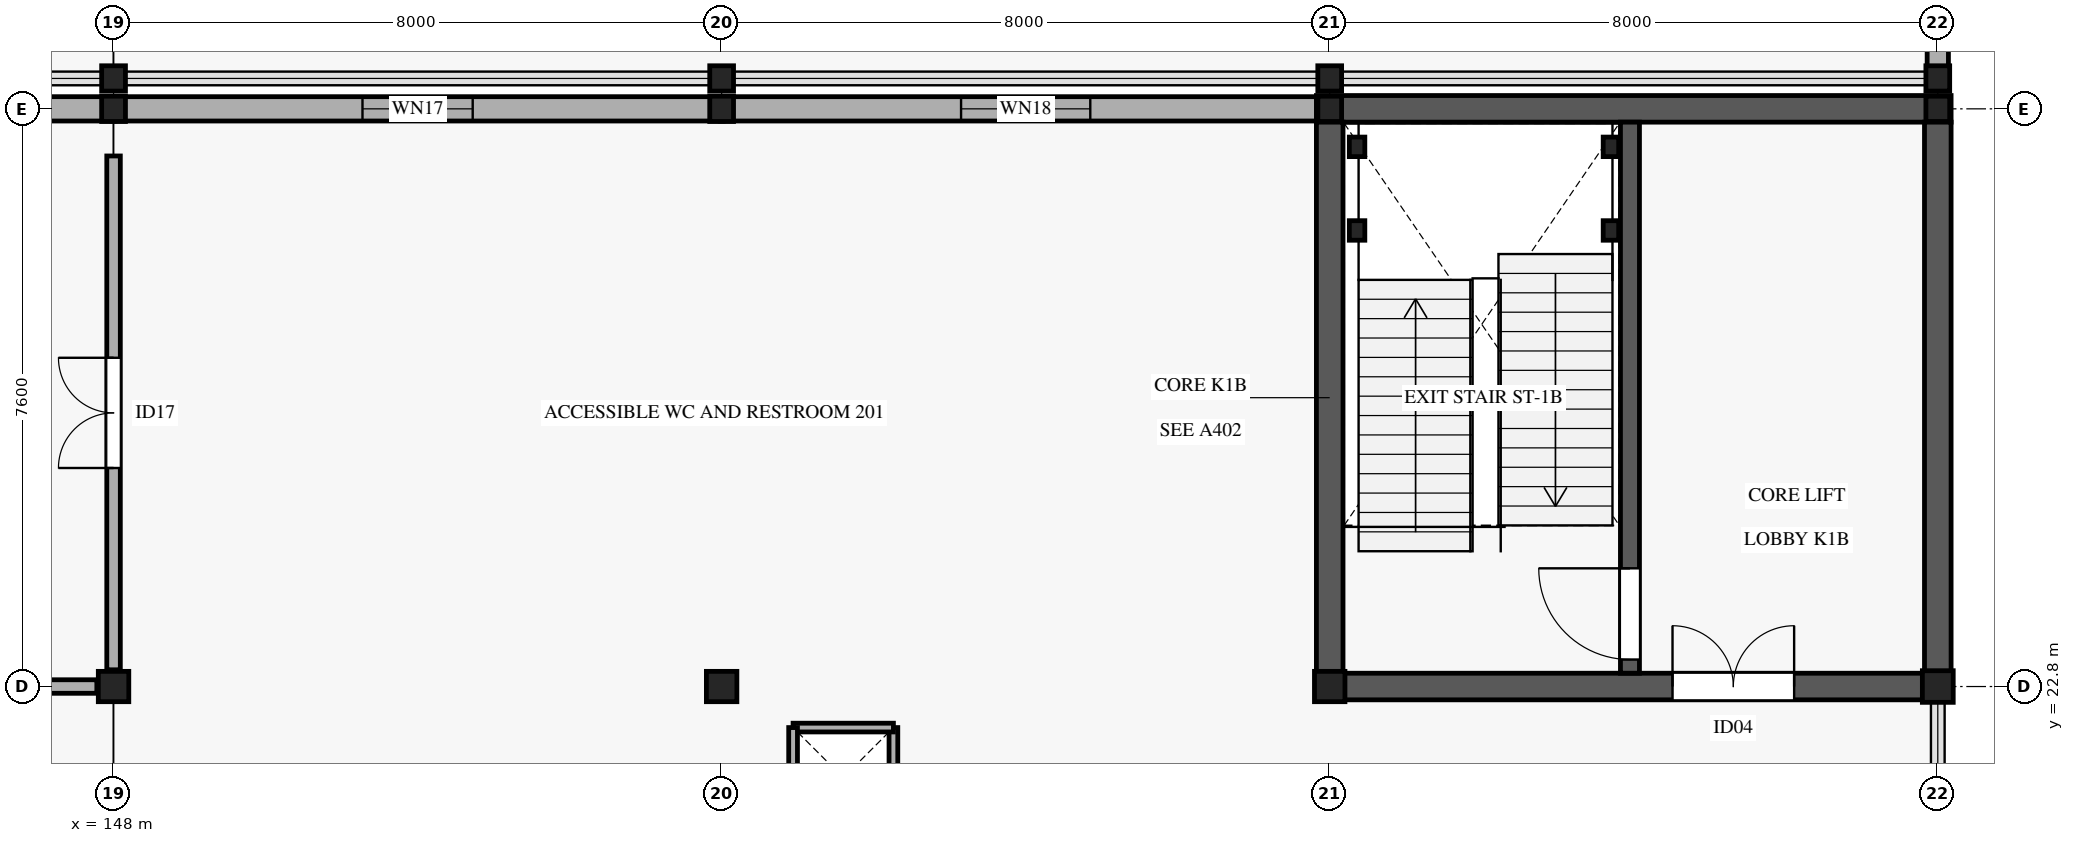
"""IFC4 building model, lengths in metres.
Left out: names, types, materials, properties, quantities, classifications, styles, units other than length and angle.
Written with IfcOpenShell. Run it as: python <this file> out.ifc"""

import sys

from ifc_helpers import new_model, si_unit, direction, frame, frame_2d, origin, origin_2d, place, context, subcontext, project, spatial, rectangle, i_section, extrude, element, fill, save


model = new_model("IFC4")
c1 = context("Model", 3, precision=1e-05, world=origin(), true_north=direction((0.0, 1.0)))
c2 = subcontext(c1, "Body", "Model", "MODEL_VIEW")
j1 = project(units=[si_unit("LENGTHUNIT", "METRE"), si_unit("PLANEANGLEUNIT", "RADIAN")], contexts=[c1])
p1 = place(None, origin())
s1 = spatial("IfcSite", under=j1, at=p1, CompositionType="ELEMENT")
p2 = place(p1, origin())
s2 = spatial("IfcBuilding", under=s1, at=p2, CompositionType="ELEMENT")
p3 = place(p2, frame((0.0, 0.0, 5.4)))
s3 = spatial("IfcBuildingStorey", under=s2, at=p3, CompositionType="ELEMENT", Elevation=5.4)
p4 = place(p3, frame((148.0, 22.8, 0.0), z_axis=(0.0, 0.0, 1.0), x_axis=(1.0, 0.0, 0.0)))
e1 = element("IfcColumn", 1, at=p4, inside=s3, PredefinedType="COLUMN", context=c2, shape_type="SweptSolid", body=[
    extrude(i_section(OverallWidth=0.401, OverallDepth=0.399, WebThickness=0.025, FlangeThickness=0.04, FilletRadius=0.015, at=origin_2d()), origin(), (0.0, 0.0, 1.0), 5.185),
])
p5 = place(p3, frame((148.0, 30.4, 0.0), z_axis=(0.0, 0.0, 1.0), x_axis=(1.0, 0.0, 0.0)))
e2 = element("IfcColumn", 2, at=p5, inside=s3, PredefinedType="COLUMN", context=c2, shape_type="SweptSolid", body=[
    extrude(i_section(OverallWidth=0.313, OverallDepth=0.333, WebThickness=0.018, FlangeThickness=0.028, FilletRadius=0.015, at=origin_2d()), origin(), (0.0, 0.0, 1.0), 5.185),
])
p6 = place(p3, frame((156.0, 22.8, 0.0), z_axis=(0.0, 0.0, 1.0), x_axis=(1.0, 0.0, 0.0)))
e3 = element("IfcColumn", 3, at=p6, inside=s3, PredefinedType="COLUMN", context=c2, shape_type="SweptSolid", body=[
    extrude(i_section(OverallWidth=0.401, OverallDepth=0.399, WebThickness=0.025, FlangeThickness=0.04, FilletRadius=0.015, at=origin_2d()), origin(), (0.0, 0.0, 1.0), 5.185),
])
p7 = place(p3, frame((156.0, 30.4, 0.0), z_axis=(0.0, 0.0, 1.0), x_axis=(1.0, 0.0, 0.0)))
e4 = element("IfcColumn", 4, at=p7, inside=s3, PredefinedType="COLUMN", context=c2, shape_type="SweptSolid", body=[
    extrude(i_section(OverallWidth=0.313, OverallDepth=0.333, WebThickness=0.018, FlangeThickness=0.028, FilletRadius=0.015, at=origin_2d()), origin(), (0.0, 0.0, 1.0), 5.185),
])
p8 = place(p3, frame((164.0, 22.8, 0.0), z_axis=(0.0, 0.0, 1.0), x_axis=(1.0, 0.0, 0.0)))
e5 = element("IfcColumn", 5, at=p8, inside=s3, PredefinedType="COLUMN", context=c2, shape_type="SweptSolid", body=[
    extrude(i_section(OverallWidth=0.401, OverallDepth=0.399, WebThickness=0.025, FlangeThickness=0.04, FilletRadius=0.015, at=origin_2d()), origin(), (0.0, 0.0, 1.0), 5.185),
])
p9 = place(p3, frame((164.0, 30.4, 0.0), z_axis=(0.0, 0.0, 1.0), x_axis=(1.0, 0.0, 0.0)))
e6 = element("IfcColumn", 6, at=p9, inside=s3, PredefinedType="COLUMN", context=c2, shape_type="SweptSolid", body=[
    extrude(i_section(OverallWidth=0.313, OverallDepth=0.333, WebThickness=0.018, FlangeThickness=0.028, FilletRadius=0.015, at=origin_2d()), origin(), (0.0, 0.0, 1.0), 5.185),
])
p10 = place(p3, frame((172.0, 22.8, 0.0), z_axis=(0.0, 0.0, 1.0), x_axis=(1.0, 0.0, 0.0)))
e7 = element("IfcColumn", 7, at=p10, inside=s3, PredefinedType="COLUMN", context=c2, shape_type="SweptSolid", body=[
    extrude(i_section(OverallWidth=0.406, OverallDepth=0.416, WebThickness=0.03, FlangeThickness=0.048, FilletRadius=0.015, at=origin_2d()), origin(), (0.0, 0.0, 1.0), 5.185),
])
for number, where, z_axis, x_axis in (
    (8, (172.0, 30.4, 0.0), (0.0, 0.0, 1.0), (1.0, 0.0, 0.0)),
    (9, (148.0, 30.8, 0.0), (0.0, 0.0, 1.0), (1.0, 0.0, 0.0)),
    (10, (156.0, 30.8, 0.0), (0.0, 0.0, 1.0), (1.0, 0.0, 0.0)),
    (11, (164.0, 30.8, 0.0), (0.0, 0.0, 1.0), (1.0, 0.0, 0.0)),
    (12, (172.0, 30.8, 0.0), (0.0, 0.0, 1.0), (1.0, 0.0, 0.0)),
):
    element("IfcColumn", number, at=place(p3, frame(where, z_axis=z_axis, x_axis=x_axis)), inside=s3, PredefinedType="COLUMN", context=c2, shape_type="SweptSolid", body=[
        extrude(i_section(OverallWidth=0.313, OverallDepth=0.333, WebThickness=0.018, FlangeThickness=0.028, FilletRadius=0.015, at=origin_2d()), origin(), (0.0, 0.0, 1.0), 5.185),
    ])
p11 = place(p3, frame((139.98, 30.4, 0.0), z_axis=(0.0, 0.0, 1.0), x_axis=(1.0, 0.0, 0.0)))
e13 = element("IfcWall", 13, at=p11, inside=s3, PredefinedType="STANDARD", context=c2, shape_type="SweptSolid", body=[
    extrude(rectangle(XDim=8.04, YDim=0.32, at=frame_2d((4.02, 0.0))), origin(), (0.0, 0.0, 1.0), 4.25),
])
p12 = place(p11, frame((3.42, 0.0, 0.75)))
e14 = element("IfcOpeningElement", 14, at=p12, cuts=e13, PredefinedType="OPENING", context=c2, shape_type="SweptSolid", body=[
    extrude(rectangle(XDim=1.2, YDim=1.8, at=frame_2d((0.6, 0.9))), frame((0.0, 0.17, 0.0), z_axis=(0.0, -1.0, 0.0), x_axis=(1.0, 0.0, 0.0)), (0.0, 0.0, 1.0), 0.34),
])
p13 = place(p3, frame((147.98, 30.4, 0.0), z_axis=(0.0, 0.0, 1.0), x_axis=(1.0, 0.0, 0.0)))
e15 = element("IfcWall", 15, at=p13, inside=s3, PredefinedType="STANDARD", context=c2, shape_type="SweptSolid", body=[
    extrude(rectangle(XDim=8.04, YDim=0.32, at=frame_2d((4.02, 0.0))), origin(), (0.0, 0.0, 1.0), 4.25),
])
p14 = place(p13, frame((3.295, 0.0, 0.75)))
e16 = element("IfcOpeningElement", 16, at=p14, cuts=e15, PredefinedType="OPENING", context=c2, shape_type="SweptSolid", body=[
    extrude(rectangle(XDim=1.45, YDim=1.8, at=frame_2d((0.725, 0.9))), frame((0.0, 0.17, 0.0), z_axis=(0.0, -1.0, 0.0), x_axis=(1.0, 0.0, 0.0)), (0.0, 0.0, 1.0), 0.34),
])
p15 = place(p3, frame((155.98, 30.4, 0.0), z_axis=(0.0, 0.0, 1.0), x_axis=(1.0, 0.0, 0.0)))
e17 = element("IfcWall", 17, at=p15, inside=s3, PredefinedType="STANDARD", context=c2, shape_type="SweptSolid", body=[
    extrude(rectangle(XDim=8.04, YDim=0.32, at=frame_2d((4.02, 0.0))), origin(), (0.0, 0.0, 1.0), 4.25),
])
p16 = place(p15, frame((3.17, 0.0, 0.75)))
e18 = element("IfcOpeningElement", 18, at=p16, cuts=e17, PredefinedType="OPENING", context=c2, shape_type="SweptSolid", body=[
    extrude(rectangle(XDim=1.7, YDim=1.8, at=frame_2d((0.85, 0.9))), frame((0.0, 0.17, 0.0), z_axis=(0.0, -1.0, 0.0), x_axis=(1.0, 0.0, 0.0)), (0.0, 0.0, 1.0), 0.34),
])
p17 = place(p3, frame((172.0, 38.02, 0.0), z_axis=(0.0, 0.0, 1.0), x_axis=(0.0, -1.0, 0.0)))
e19 = element("IfcWall", 19, at=p17, inside=s3, PredefinedType="STANDARD", context=c2, shape_type="SweptSolid", body=[
    extrude(rectangle(XDim=7.24, YDim=0.28, at=frame_2d((3.62, 0.0))), origin(), (0.0, 0.0, 1.0), 4.25),
])
p18 = place(p17, frame((1.82, 0.0, 0.75)))
e20 = element("IfcOpeningElement", 20, at=p18, cuts=e19, PredefinedType="OPENING", context=c2, shape_type="SweptSolid", body=[
    extrude(rectangle(XDim=3.6, YDim=2.15, at=frame_2d((1.8, 1.075))), frame((0.0, 0.15, 0.0), z_axis=(0.0, -1.0, 0.0), x_axis=(1.0, 0.0, 0.0)), (0.0, 0.0, 1.0), 0.3),
])
for number, where, z_axis, x_axis in (
    (21, (158.26, 20.94, 0.0), (0.0, 0.0, 1.0), (0.0, 1.0, 0.0)),
    (22, (158.26, 22.26, 0.0), (0.0, 0.0, 1.0), (-1.0, 0.0, 0.0)),
    (23, (156.94, 22.26, 0.0), (0.0, 0.0, 1.0), (0.0, -1.0, 0.0)),
):
    element("IfcWall", number, at=place(p3, frame(where, z_axis=z_axis, x_axis=x_axis)), inside=s3, PredefinedType="PARTITIONING", context=c2, shape_type="SweptSolid", body=[
        extrude(rectangle(XDim=1.32, YDim=0.115, at=frame_2d((0.66, 0.0))), origin(), (0.0, 0.0, 1.0), 4.35),
    ])
p19 = place(p3, frame((163.825, 22.8, 0.0), z_axis=(0.0, 0.0, 1.0), x_axis=(1.0, 0.0, 0.0)))
e24 = element("IfcWall", 24, at=p19, inside=s3, PredefinedType="SHEAR", context=c2, shape_type="SweptSolid", body=[
    extrude(rectangle(XDim=8.35, YDim=0.35, at=frame_2d((4.175, 0.0))), origin(), (0.0, 0.0, 1.0), 5.19),
])
p20 = place(p19, frame((4.685, 0.0, 0.0)))
e25 = element("IfcOpeningElement", 25, at=p20, cuts=e24, PredefinedType="OPENING", context=c2, shape_type="SweptSolid", body=[
    extrude(rectangle(XDim=1.6, YDim=2.35, at=frame_2d((0.8, 1.175))), frame((0.0, 0.185, 0.0), z_axis=(0.0, -1.0, 0.0), x_axis=(1.0, 0.0, 0.0)), (0.0, 0.0, 1.0), 0.37),
])
p21 = place(p3, frame((163.825, 30.4, 0.0), z_axis=(0.0, 0.0, 1.0), x_axis=(1.0, 0.0, 0.0)))
e26 = element("IfcWall", 26, at=p21, inside=s3, PredefinedType="SHEAR", context=c2, shape_type="SweptSolid", body=[
    extrude(rectangle(XDim=8.35, YDim=0.35, at=frame_2d((4.175, 0.0))), origin(), (0.0, 0.0, 1.0), 5.19),
])
for number, where, z_axis, x_axis in (
    (27, (164.0, 22.975, 0.0), (0.0, 0.0, 1.0), (0.0, 1.0, 0.0)),
    (28, (172.0, 22.975, 0.0), (0.0, 0.0, 1.0), (0.0, 1.0, 0.0)),
):
    element("IfcWall", number, at=place(p3, frame(where, z_axis=z_axis, x_axis=x_axis)), inside=s3, PredefinedType="SHEAR", context=c2, shape_type="SweptSolid", body=[
        extrude(rectangle(XDim=7.25, YDim=0.35, at=frame_2d((3.625, 0.0))), origin(), (0.0, 0.0, 1.0), 5.19),
    ])
p22 = place(p3, frame((167.95, 22.975, 0.0), z_axis=(0.0, 0.0, 1.0), x_axis=(0.0, 1.0, 0.0)))
e29 = element("IfcWall", 29, at=p22, inside=s3, PredefinedType="SHEAR", context=c2, shape_type="SweptSolid", body=[
    extrude(rectangle(XDim=7.25, YDim=0.25, at=frame_2d((3.625, 0.0))), origin(), (0.0, 0.0, 1.0), 5.19),
])
p23 = place(p22, frame((0.18, 0.0, 0.0)))
e30 = element("IfcOpeningElement", 30, at=p23, cuts=e29, PredefinedType="OPENING", context=c2, shape_type="SweptSolid", body=[
    extrude(rectangle(XDim=1.2, YDim=2.2, at=frame_2d((0.6, 1.1))), frame((0.0, 0.135, 0.0), z_axis=(0.0, -1.0, 0.0), x_axis=(1.0, 0.0, 0.0)), (0.0, 0.0, 1.0), 0.27),
])
for number, where, z_axis, x_axis in (
    (31, (164.36, 28.8, 0.0), (0.0, 0.0, 1.0), (1.0, 0.0, 0.0)),
    (32, (167.7, 28.8, 0.0), (0.0, 0.0, 1.0), (1.0, 0.0, 0.0)),
    (33, (164.36, 29.9, 0.0), (0.0, 0.0, 1.0), (1.0, 0.0, 0.0)),
    (34, (167.7, 29.9, 0.0), (0.0, 0.0, 1.0), (1.0, 0.0, 0.0)),
):
    element("IfcColumn", number, at=place(p3, frame(where, z_axis=z_axis, x_axis=x_axis)), inside=s3, PredefinedType="COLUMN", context=c2, shape_type="SweptSolid", body=[
        extrude(i_section(OverallWidth=0.204, OverallDepth=0.257, WebThickness=0.009, FlangeThickness=0.016, FilletRadius=0.013, at=origin_2d()), origin(), (0.0, 0.0, 1.0), 5.395),
    ])
p24 = place(p3, frame((132.62, 22.8, 0.0), z_axis=(0.0, 0.0, 1.0), x_axis=(1.0, 0.0, 0.0)))
e35 = element("IfcWall", 35, at=p24, inside=s3, PredefinedType="PARTITIONING", context=c2, shape_type="SweptSolid", body=[
    extrude(rectangle(XDim=15.16, YDim=0.178, at=frame_2d((7.58, 0.0))), origin(), (0.0, 0.0, 1.0), 4.05),
])
p25 = place(p24, frame((5.005, 0.0, 0.0)))
e36 = element("IfcOpeningElement", 36, at=p25, cuts=e35, PredefinedType="OPENING", context=c2, shape_type="SweptSolid", body=[
    extrude(rectangle(XDim=1.55, YDim=2.3, at=frame_2d((0.775, 1.15))), frame((0.0, 0.099, 0.0), z_axis=(0.0, -1.0, 0.0), x_axis=(1.0, 0.0, 0.0)), (0.0, 0.0, 1.0), 0.198),
])
p26 = place(p3, frame((148.0, 23.02, 0.0), z_axis=(0.0, 0.0, 1.0), x_axis=(0.0, 1.0, 0.0)))
e37 = element("IfcWall", 37, at=p26, inside=s3, PredefinedType="PARTITIONING", context=c2, shape_type="SweptSolid", body=[
    extrude(rectangle(XDim=6.76, YDim=0.178, at=frame_2d((3.38, 0.0))), origin(), (0.0, 0.0, 1.0), 4.05),
])
p27 = place(p26, frame((2.655, 0.0, 0.0)))
e38 = element("IfcOpeningElement", 38, at=p27, cuts=e37, PredefinedType="OPENING", context=c2, shape_type="SweptSolid", body=[
    extrude(rectangle(XDim=1.45, YDim=2.25, at=frame_2d((0.725, 1.125))), frame((0.0, 0.099, 0.0), z_axis=(0.0, -1.0, 0.0), x_axis=(1.0, 0.0, 0.0)), (0.0, 0.0, 1.0), 0.198),
])
p28 = place(p14, origin())
e39 = element("IfcWindow", 39, at=p28, inside=s3, PartitioningType="SINGLE_PANEL", PredefinedType="WINDOW", context=c2, shape_type="SweptSolid", body=[
    extrude(rectangle(XDim=1.45, YDim=1.8, at=frame_2d((0.725, 0.9))), frame((0.0, 0.03, 0.0), z_axis=(0.0, -1.0, 0.0), x_axis=(1.0, 0.0, 0.0)), (0.0, 0.0, 1.0), 0.06),
])
fill(e16, e39)
p29 = place(p16, origin())
e40 = element("IfcWindow", 40, at=p29, inside=s3, PartitioningType="SINGLE_PANEL", PredefinedType="WINDOW", context=c2, shape_type="SweptSolid", body=[
    extrude(rectangle(XDim=1.7, YDim=1.8, at=frame_2d((0.85, 0.9))), frame((0.0, 0.03, 0.0), z_axis=(0.0, -1.0, 0.0), x_axis=(1.0, 0.0, 0.0)), (0.0, 0.0, 1.0), 0.06),
])
fill(e18, e40)
p30 = place(p23, origin())
e41 = element("IfcDoor", 41, at=p30, inside=s3, OperationType="SINGLE_SWING_RIGHT", PredefinedType="DOOR", context=c2, shape_type="SweptSolid", body=[
    extrude(rectangle(XDim=1.2, YDim=2.2, at=frame_2d((0.6, 1.1))), frame((0.0, 0.025, 0.0), z_axis=(0.0, -1.0, 0.0), x_axis=(1.0, 0.0, 0.0)), (0.0, 0.0, 1.0), 0.05),
])
fill(e30, e41)
p31 = place(p20, origin())
e42 = element("IfcDoor", 42, at=p31, inside=s3, OperationType="DOUBLE_DOOR_SINGLE_SWING", PredefinedType="DOOR", context=c2, shape_type="SweptSolid", body=[
    extrude(rectangle(XDim=1.6, YDim=2.35, at=frame_2d((0.8, 1.175))), frame((0.0, 0.025, 0.0), z_axis=(0.0, -1.0, 0.0), x_axis=(1.0, 0.0, 0.0)), (0.0, 0.0, 1.0), 0.05),
])
fill(e25, e42)
p32 = place(p27, origin())
e43 = element("IfcDoor", 43, at=p32, inside=s3, OperationType="DOUBLE_DOOR_SINGLE_SWING", PredefinedType="DOOR", context=c2, shape_type="SweptSolid", body=[
    extrude(rectangle(XDim=1.45, YDim=2.25, at=frame_2d((0.725, 1.125))), frame((0.0, 0.025, 0.0), z_axis=(0.0, -1.0, 0.0), x_axis=(1.0, 0.0, 0.0)), (0.0, 0.0, 1.0), 0.05),
])
fill(e38, e43)
save(model, sys.argv[1])
